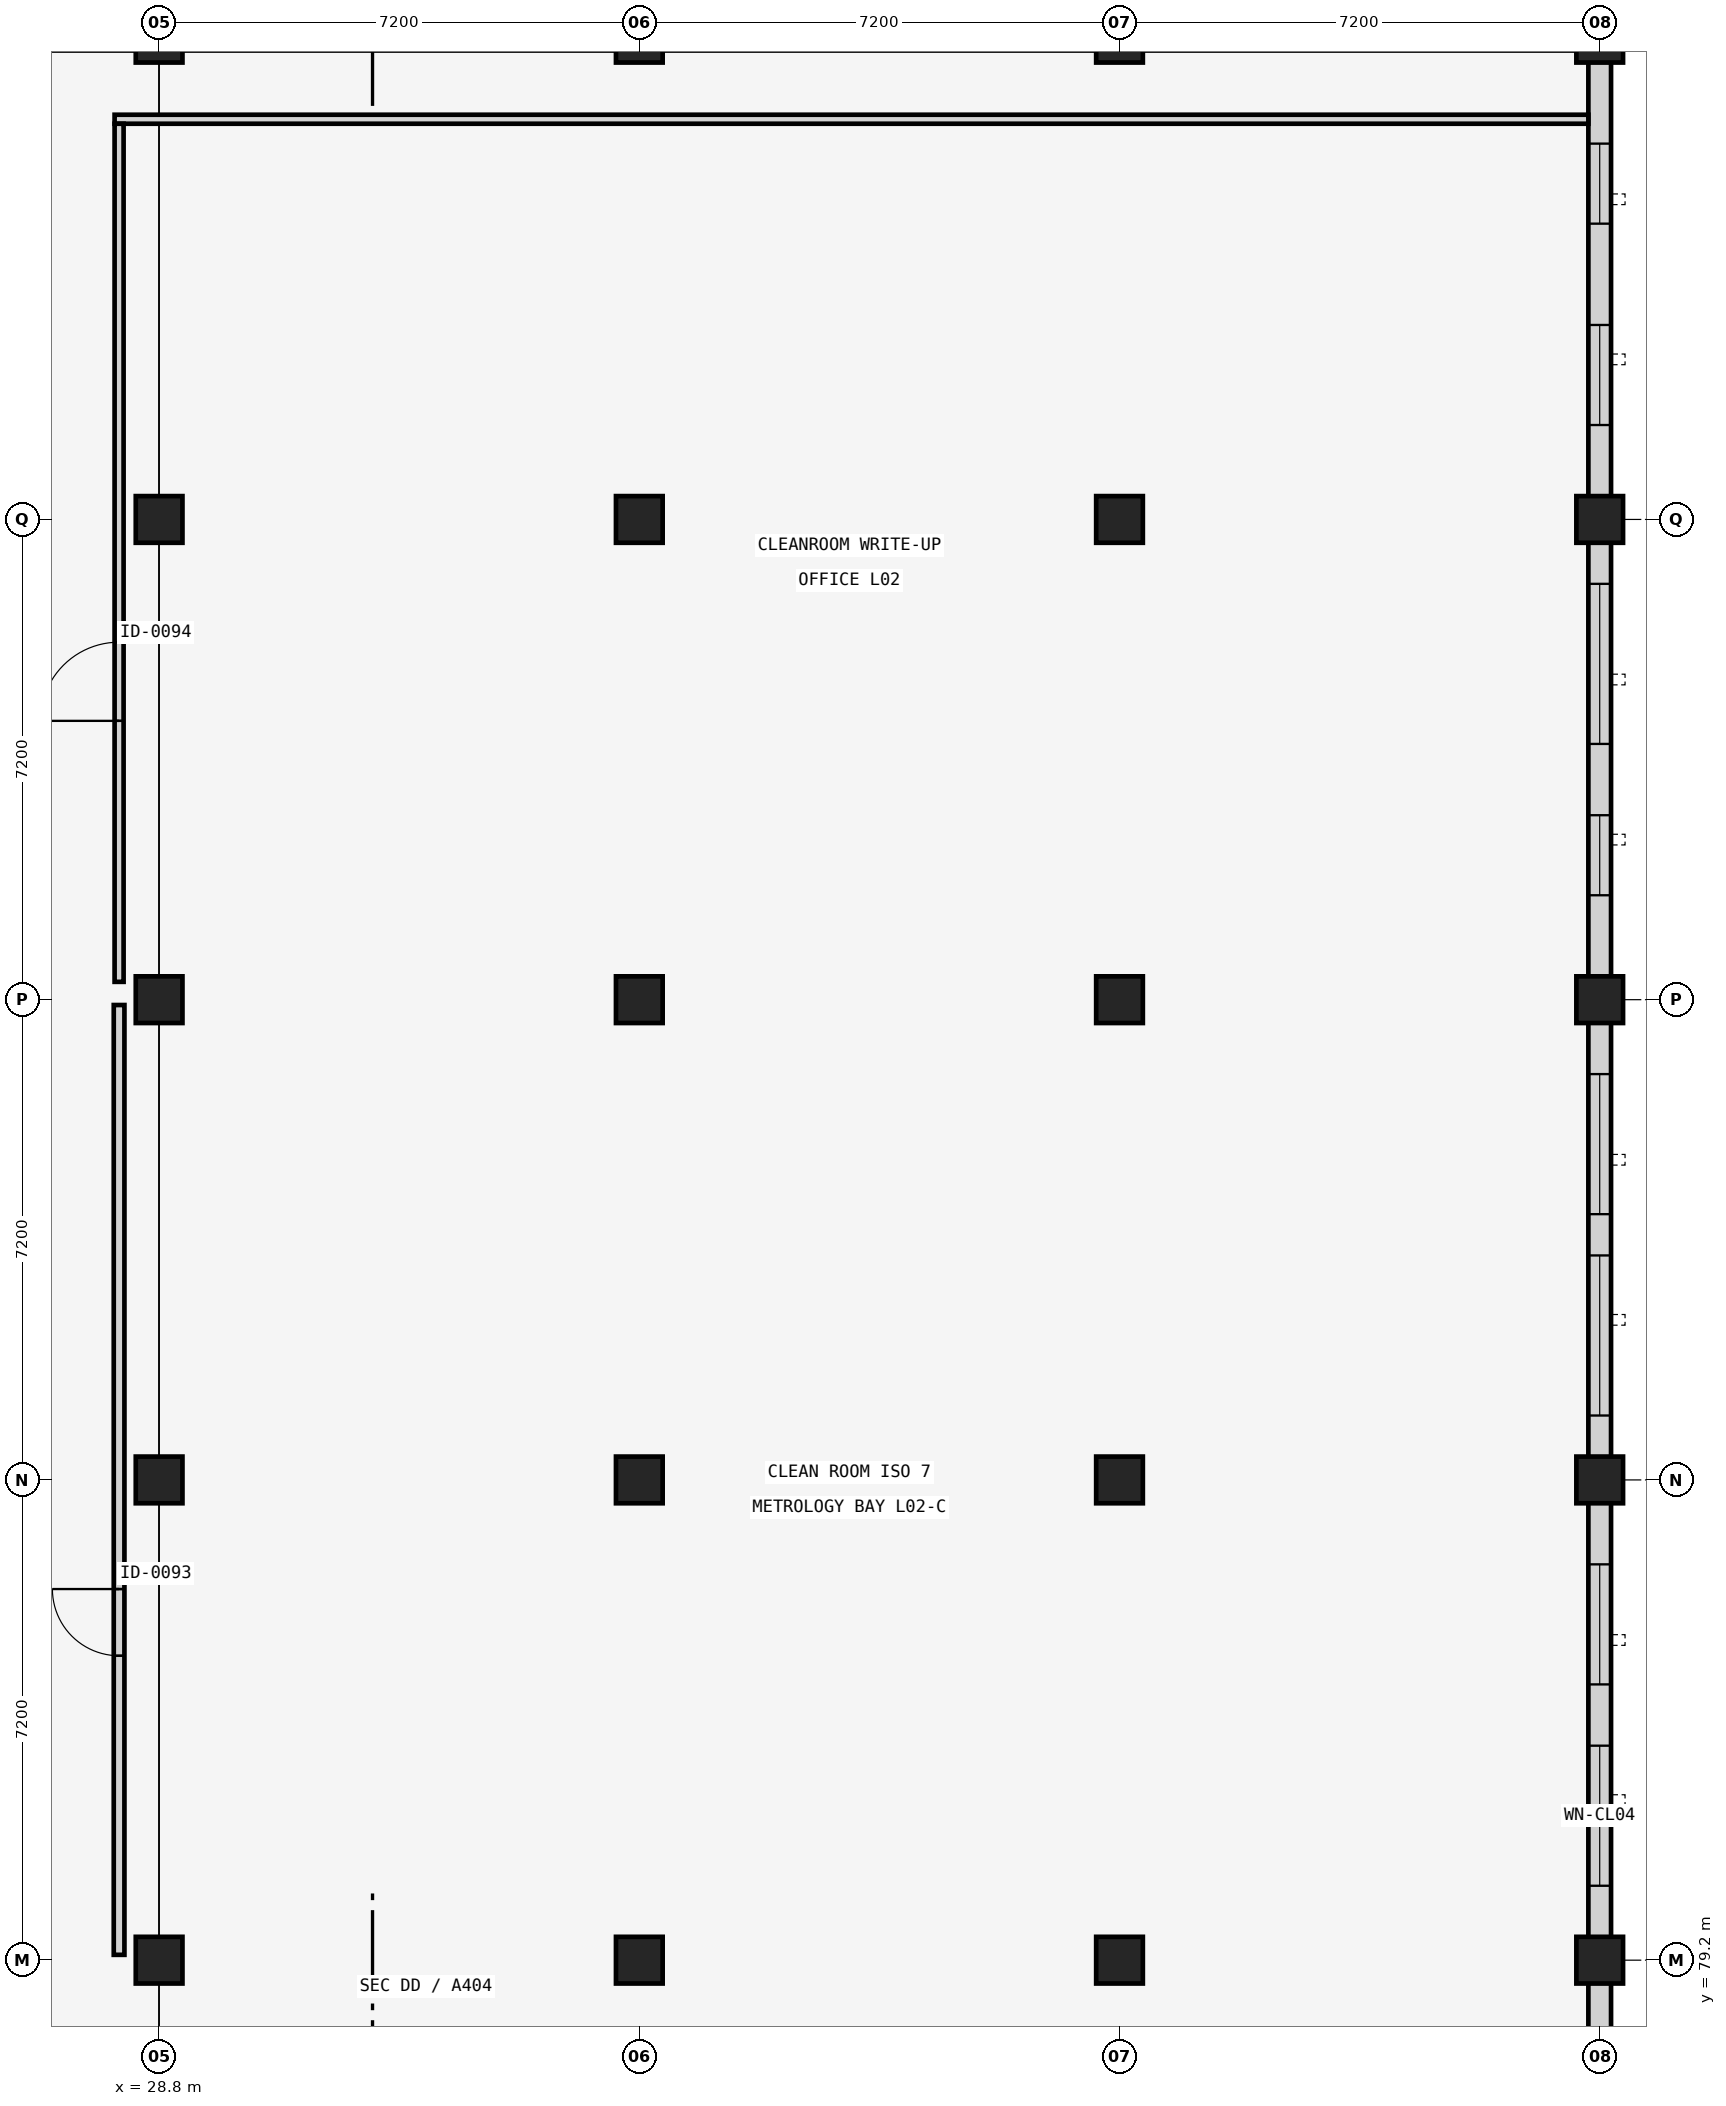
"""IFC4 building model, lengths in metres.
Left out: names, types, materials, properties, quantities, classifications, styles, units other than length and angle.
Written with IfcOpenShell. Run it as: python <this file> out.ifc"""

import sys

from ifc_helpers import new_model, si_unit, direction, frame, frame_2d, origin, origin_2d, place, context, subcontext, project, spatial, rectangle, extrude, element, fill, save


model = new_model("IFC4")
c1 = context("Model", 3, precision=1e-05, world=origin(), true_north=direction((0.0, 1.0)))
c2 = subcontext(c1, "Body", "Model", "MODEL_VIEW")
j1 = project(units=[si_unit("LENGTHUNIT", "METRE"), si_unit("PLANEANGLEUNIT", "RADIAN")], contexts=[c1])
p1 = place(None, origin())
s1 = spatial("IfcSite", under=j1, at=p1, CompositionType="ELEMENT")
p2 = place(p1, origin())
s2 = spatial("IfcBuilding", under=s1, at=p2, CompositionType="ELEMENT")
p3 = place(p2, frame((0.0, 0.0, 8.96)))
s3 = spatial("IfcBuildingStorey", under=s2, at=p3, CompositionType="ELEMENT", Elevation=8.96)
for number, where, z_axis, x_axis in (
    (1, (28.8, 79.2, 0.0), (0.0, 0.0, 1.0), (1.0, 0.0, 0.0)),
    (2, (28.8, 86.4, 0.0), (0.0, 0.0, 1.0), (1.0, 0.0, 0.0)),
    (3, (28.8, 93.6, 0.0), (0.0, 0.0, 1.0), (1.0, 0.0, 0.0)),
    (4, (28.8, 100.8, 0.0), (0.0, 0.0, 1.0), (1.0, 0.0, 0.0)),
    (5, (28.8, 108.0, 0.0), (0.0, 0.0, 1.0), (1.0, 0.0, 0.0)),
    (6, (36.0, 79.2, 0.0), (0.0, 0.0, 1.0), (1.0, 0.0, 0.0)),
    (7, (36.0, 86.4, 0.0), (0.0, 0.0, 1.0), (1.0, 0.0, 0.0)),
    (8, (36.0, 93.6, 0.0), (0.0, 0.0, 1.0), (1.0, 0.0, 0.0)),
    (9, (36.0, 100.8, 0.0), (0.0, 0.0, 1.0), (1.0, 0.0, 0.0)),
    (10, (36.0, 108.0, 0.0), (0.0, 0.0, 1.0), (1.0, 0.0, 0.0)),
    (11, (43.2, 79.2, 0.0), (0.0, 0.0, 1.0), (1.0, 0.0, 0.0)),
    (12, (43.2, 86.4, 0.0), (0.0, 0.0, 1.0), (1.0, 0.0, 0.0)),
    (13, (43.2, 93.6, 0.0), (0.0, 0.0, 1.0), (1.0, 0.0, 0.0)),
    (14, (43.2, 100.8, 0.0), (0.0, 0.0, 1.0), (1.0, 0.0, 0.0)),
    (15, (43.2, 108.0, 0.0), (0.0, 0.0, 1.0), (1.0, 0.0, 0.0)),
    (16, (50.4, 79.2, 0.0), (0.0, 0.0, 1.0), (1.0, 0.0, 0.0)),
    (17, (50.4, 86.4, 0.0), (0.0, 0.0, 1.0), (1.0, 0.0, 0.0)),
    (18, (50.4, 93.6, 0.0), (0.0, 0.0, 1.0), (1.0, 0.0, 0.0)),
    (19, (50.4, 100.8, 0.0), (0.0, 0.0, 1.0), (1.0, 0.0, 0.0)),
    (20, (50.4, 108.0, 0.0), (0.0, 0.0, 1.0), (1.0, 0.0, 0.0)),
):
    element("IfcColumn", number, at=place(p3, frame(where, z_axis=z_axis, x_axis=x_axis)), inside=s3, PredefinedType="COLUMN", context=c2, shape_type="SweptSolid", body=[
        extrude(rectangle(XDim=0.7, YDim=0.7, at=origin_2d()), origin(), (0.0, 0.0, 1.0), 4.16),
    ])
p4 = place(p3, frame((50.4, 72.34, 0.0), z_axis=(0.0, 0.0, 1.0), x_axis=(0.0, 1.0, 0.0)))
e21 = element("IfcWall", 21, at=p4, inside=s3, PredefinedType="SOLIDWALL", context=c2, shape_type="SweptSolid", body=[
    extrude(rectangle(XDim=6.52, YDim=0.34, at=frame_2d((3.26, 0.0))), origin(), (0.0, 0.0, 1.0), 3.21),
])
p5 = place(p4, frame((0.926, 0.0, 1.0)))
e22 = element("IfcOpeningElement", 22, at=p5, cuts=e21, PredefinedType="OPENING", context=c2, shape_type="SweptSolid", body=[
    extrude(rectangle(XDim=1.8, YDim=1.5, at=frame_2d((0.9, 0.75))), frame((0.0, 0.18, 0.0), z_axis=(0.0, -1.0, 0.0), x_axis=(1.0, 0.0, 0.0)), (0.0, 0.0, 1.0), 0.36),
])
p6 = place(p4, frame((3.944, 0.0, 1.0)))
e23 = element("IfcOpeningElement", 23, at=p6, cuts=e21, PredefinedType="OPENING", context=c2, shape_type="SweptSolid", body=[
    extrude(rectangle(XDim=1.5, YDim=1.65, at=frame_2d((0.75, 0.825))), frame((0.0, 0.18, 0.0), z_axis=(0.0, -1.0, 0.0), x_axis=(1.0, 0.0, 0.0)), (0.0, 0.0, 1.0), 0.36),
])
p7 = place(p3, frame((50.4, 79.54, 0.0), z_axis=(0.0, 0.0, 1.0), x_axis=(0.0, 1.0, 0.0)))
e24 = element("IfcWall", 24, at=p7, inside=s3, PredefinedType="SOLIDWALL", context=c2, shape_type="SweptSolid", body=[
    extrude(rectangle(XDim=6.52, YDim=0.34, at=frame_2d((3.26, 0.0))), origin(), (0.0, 0.0, 1.0), 3.21),
])
p8 = place(p7, frame((0.776, 0.0, 1.0)))
e25 = element("IfcOpeningElement", 25, at=p8, cuts=e24, PredefinedType="OPENING", context=c2, shape_type="SweptSolid", body=[
    extrude(rectangle(XDim=2.1, YDim=1.5, at=frame_2d((1.05, 0.75))), frame((0.0, 0.18, 0.0), z_axis=(0.0, -1.0, 0.0), x_axis=(1.0, 0.0, 0.0)), (0.0, 0.0, 1.0), 0.36),
])
p9 = place(p7, frame((3.794, 0.0, 1.0)))
e26 = element("IfcOpeningElement", 26, at=p9, cuts=e24, PredefinedType="OPENING", context=c2, shape_type="SweptSolid", body=[
    extrude(rectangle(XDim=1.8, YDim=1.65, at=frame_2d((0.9, 0.825))), frame((0.0, 0.18, 0.0), z_axis=(0.0, -1.0, 0.0), x_axis=(1.0, 0.0, 0.0)), (0.0, 0.0, 1.0), 0.36),
])
p10 = place(p3, frame((50.4, 86.74, 0.0), z_axis=(0.0, 0.0, 1.0), x_axis=(0.0, 1.0, 0.0)))
e27 = element("IfcWall", 27, at=p10, inside=s3, PredefinedType="SOLIDWALL", context=c2, shape_type="SweptSolid", body=[
    extrude(rectangle(XDim=6.52, YDim=0.34, at=frame_2d((3.26, 0.0))), origin(), (0.0, 0.0, 1.0), 3.21),
])
p11 = place(p10, frame((0.625, 0.0, 1.0)))
e28 = element("IfcOpeningElement", 28, at=p11, cuts=e27, PredefinedType="OPENING", context=c2, shape_type="SweptSolid", body=[
    extrude(rectangle(XDim=2.4, YDim=1.5, at=frame_2d((1.2, 0.75))), frame((0.0, 0.18, 0.0), z_axis=(0.0, -1.0, 0.0), x_axis=(1.0, 0.0, 0.0)), (0.0, 0.0, 1.0), 0.36),
])
p12 = place(p10, frame((3.644, 0.0, 1.0)))
e29 = element("IfcOpeningElement", 29, at=p12, cuts=e27, PredefinedType="OPENING", context=c2, shape_type="SweptSolid", body=[
    extrude(rectangle(XDim=2.1, YDim=1.65, at=frame_2d((1.05, 0.825))), frame((0.0, 0.18, 0.0), z_axis=(0.0, -1.0, 0.0), x_axis=(1.0, 0.0, 0.0)), (0.0, 0.0, 1.0), 0.36),
])
p13 = place(p3, frame((50.4, 93.94, 0.0), z_axis=(0.0, 0.0, 1.0), x_axis=(0.0, 1.0, 0.0)))
e30 = element("IfcWall", 30, at=p13, inside=s3, PredefinedType="SOLIDWALL", context=c2, shape_type="SweptSolid", body=[
    extrude(rectangle(XDim=6.52, YDim=0.34, at=frame_2d((3.26, 0.0))), origin(), (0.0, 0.0, 1.0), 3.21),
])
p14 = place(p13, frame((1.226, 0.0, 1.0)))
e31 = element("IfcOpeningElement", 31, at=p14, cuts=e30, PredefinedType="OPENING", context=c2, shape_type="SweptSolid", body=[
    extrude(rectangle(XDim=1.2, YDim=1.65, at=frame_2d((0.6, 0.825))), frame((0.0, 0.18, 0.0), z_axis=(0.0, -1.0, 0.0), x_axis=(1.0, 0.0, 0.0)), (0.0, 0.0, 1.0), 0.36),
])
p15 = place(p13, frame((3.494, 0.0, 1.0)))
e32 = element("IfcOpeningElement", 32, at=p15, cuts=e30, PredefinedType="OPENING", context=c2, shape_type="SweptSolid", body=[
    extrude(rectangle(XDim=2.4, YDim=1.65, at=frame_2d((1.2, 0.825))), frame((0.0, 0.18, 0.0), z_axis=(0.0, -1.0, 0.0), x_axis=(1.0, 0.0, 0.0)), (0.0, 0.0, 1.0), 0.36),
])
p16 = place(p3, frame((50.4, 101.14, 0.0), z_axis=(0.0, 0.0, 1.0), x_axis=(0.0, 1.0, 0.0)))
e33 = element("IfcWall", 33, at=p16, inside=s3, PredefinedType="SOLIDWALL", context=c2, shape_type="SweptSolid", body=[
    extrude(rectangle(XDim=6.52, YDim=0.34, at=frame_2d((3.26, 0.0))), origin(), (0.0, 0.0, 1.0), 3.21),
])
p17 = place(p16, frame((1.076, 0.0, 1.0)))
e34 = element("IfcOpeningElement", 34, at=p17, cuts=e33, PredefinedType="OPENING", context=c2, shape_type="SweptSolid", body=[
    extrude(rectangle(XDim=1.5, YDim=1.65, at=frame_2d((0.75, 0.825))), frame((0.0, 0.18, 0.0), z_axis=(0.0, -1.0, 0.0), x_axis=(1.0, 0.0, 0.0)), (0.0, 0.0, 1.0), 0.36),
])
p18 = place(p16, frame((4.094, 0.0, 1.0)))
e35 = element("IfcOpeningElement", 35, at=p18, cuts=e33, PredefinedType="OPENING", context=c2, shape_type="SweptSolid", body=[
    extrude(rectangle(XDim=1.2, YDim=1.5, at=frame_2d((0.6, 0.75))), frame((0.0, 0.18, 0.0), z_axis=(0.0, -1.0, 0.0), x_axis=(1.0, 0.0, 0.0)), (0.0, 0.0, 1.0), 0.36),
])
p19 = place(p3, frame((28.2, 79.28, 0.0), z_axis=(0.0, 0.0, 1.0), x_axis=(0.0, 1.0, 0.0)))
e36 = element("IfcWall", 36, at=p19, inside=s3, PredefinedType="PARTITIONING", context=c2, shape_type="SweptSolid", body=[
    extrude(rectangle(XDim=14.24, YDim=0.16, at=frame_2d((7.12, 0.0))), origin(), (0.0, 0.0, 1.0), 3.16),
])
p20 = place(p19, frame((4.484, 0.0, 0.0)))
e37 = element("IfcOpeningElement", 37, at=p20, cuts=e36, PredefinedType="OPENING", context=c2, shape_type="SweptSolid", body=[
    extrude(rectangle(XDim=1.0, YDim=2.15, at=frame_2d((0.5, 1.075))), frame((0.0, 0.09, 0.0), z_axis=(0.0, -1.0, 0.0), x_axis=(1.0, 0.0, 0.0)), (0.0, 0.0, 1.0), 0.18),
])
p21 = place(p3, frame((28.133, 106.8, 0.0), z_axis=(0.0, 0.0, 1.0), x_axis=(1.0, 0.0, 0.0)))
e38 = element("IfcWall", 38, at=p21, inside=s3, PredefinedType="PARTITIONING", context=c2, shape_type="SweptSolid", body=[
    extrude(rectangle(XDim=22.097, YDim=0.135, at=frame_2d((11.049, 0.0))), origin(), (0.0, 0.0, 1.0), 3.21),
])
p22 = place(p3, frame((28.2, 93.867, 0.0), z_axis=(0.0, 0.0, 1.0), x_axis=(0.0, 1.0, 0.0)))
e39 = element("IfcWall", 39, at=p22, inside=s3, PredefinedType="PARTITIONING", context=c2, shape_type="SweptSolid", body=[
    extrude(rectangle(XDim=12.865, YDim=0.135, at=frame_2d((6.433, 0.0))), origin(), (0.0, 0.0, 1.0), 3.16),
])
p23 = place(p22, frame((3.913, 0.0, 0.0)))
e40 = element("IfcOpeningElement", 40, at=p23, cuts=e39, PredefinedType="OPENING", context=c2, shape_type="SweptSolid", body=[
    extrude(rectangle(XDim=1.18, YDim=2.08, at=frame_2d((0.59, 1.04))), frame((0.0, 0.078, 0.0), z_axis=(0.0, -1.0, 0.0), x_axis=(1.0, 0.0, 0.0)), (0.0, 0.0, 1.0), 0.155),
])
p24 = place(p8, origin())
e41 = element("IfcWindow", 41, at=p24, inside=s3, PartitioningType="SINGLE_PANEL", PredefinedType="WINDOW", context=c2, shape_type="SweptSolid", body=[
    extrude(rectangle(XDim=2.1, YDim=1.5, at=frame_2d((1.05, 0.75))), frame((0.0, 0.03, 0.0), z_axis=(0.0, -1.0, 0.0), x_axis=(1.0, 0.0, 0.0)), (0.0, 0.0, 1.0), 0.06),
])
fill(e25, e41)
p25 = place(p9, origin())
e42 = element("IfcWindow", 42, at=p25, inside=s3, PartitioningType="SINGLE_PANEL", PredefinedType="WINDOW", context=c2, shape_type="SweptSolid", body=[
    extrude(rectangle(XDim=1.8, YDim=1.65, at=frame_2d((0.9, 0.825))), frame((0.0, 0.03, 0.0), z_axis=(0.0, -1.0, 0.0), x_axis=(1.0, 0.0, 0.0)), (0.0, 0.0, 1.0), 0.06),
])
fill(e26, e42)
p26 = place(p11, origin())
e43 = element("IfcWindow", 43, at=p26, inside=s3, PartitioningType="SINGLE_PANEL", PredefinedType="WINDOW", context=c2, shape_type="SweptSolid", body=[
    extrude(rectangle(XDim=2.4, YDim=1.5, at=frame_2d((1.2, 0.75))), frame((0.0, 0.03, 0.0), z_axis=(0.0, -1.0, 0.0), x_axis=(1.0, 0.0, 0.0)), (0.0, 0.0, 1.0), 0.06),
])
fill(e28, e43)
p27 = place(p12, origin())
e44 = element("IfcWindow", 44, at=p27, inside=s3, PartitioningType="SINGLE_PANEL", PredefinedType="WINDOW", context=c2, shape_type="SweptSolid", body=[
    extrude(rectangle(XDim=2.1, YDim=1.65, at=frame_2d((1.05, 0.825))), frame((0.0, 0.03, 0.0), z_axis=(0.0, -1.0, 0.0), x_axis=(1.0, 0.0, 0.0)), (0.0, 0.0, 1.0), 0.06),
])
fill(e29, e44)
p28 = place(p14, origin())
e45 = element("IfcWindow", 45, at=p28, inside=s3, PartitioningType="SINGLE_PANEL", PredefinedType="WINDOW", context=c2, shape_type="SweptSolid", body=[
    extrude(rectangle(XDim=1.2, YDim=1.65, at=frame_2d((0.6, 0.825))), frame((0.0, 0.03, 0.0), z_axis=(0.0, -1.0, 0.0), x_axis=(1.0, 0.0, 0.0)), (0.0, 0.0, 1.0), 0.06),
])
fill(e31, e45)
p29 = place(p15, origin())
e46 = element("IfcWindow", 46, at=p29, inside=s3, PartitioningType="SINGLE_PANEL", PredefinedType="WINDOW", context=c2, shape_type="SweptSolid", body=[
    extrude(rectangle(XDim=2.4, YDim=1.65, at=frame_2d((1.2, 0.825))), frame((0.0, 0.03, 0.0), z_axis=(0.0, -1.0, 0.0), x_axis=(1.0, 0.0, 0.0)), (0.0, 0.0, 1.0), 0.06),
])
fill(e32, e46)
p30 = place(p17, origin())
e47 = element("IfcWindow", 47, at=p30, inside=s3, PartitioningType="SINGLE_PANEL", PredefinedType="WINDOW", context=c2, shape_type="SweptSolid", body=[
    extrude(rectangle(XDim=1.5, YDim=1.65, at=frame_2d((0.75, 0.825))), frame((0.0, 0.03, 0.0), z_axis=(0.0, -1.0, 0.0), x_axis=(1.0, 0.0, 0.0)), (0.0, 0.0, 1.0), 0.06),
])
fill(e34, e47)
p31 = place(p18, origin())
e48 = element("IfcWindow", 48, at=p31, inside=s3, PartitioningType="SINGLE_PANEL", PredefinedType="WINDOW", context=c2, shape_type="SweptSolid", body=[
    extrude(rectangle(XDim=1.2, YDim=1.5, at=frame_2d((0.6, 0.75))), frame((0.0, 0.03, 0.0), z_axis=(0.0, -1.0, 0.0), x_axis=(1.0, 0.0, 0.0)), (0.0, 0.0, 1.0), 0.06),
])
fill(e35, e48)
p32 = place(p20, origin())
e49 = element("IfcDoor", 49, at=p32, inside=s3, OperationType="SINGLE_SWING_RIGHT", PredefinedType="DOOR", context=c2, shape_type="SweptSolid", body=[
    extrude(rectangle(XDim=1.0, YDim=2.15, at=frame_2d((0.5, 1.075))), frame((0.0, 0.025, 0.0), z_axis=(0.0, -1.0, 0.0), x_axis=(1.0, 0.0, 0.0)), (0.0, 0.0, 1.0), 0.05),
])
fill(e37, e49)
p33 = place(p23, origin())
e50 = element("IfcDoor", 50, at=p33, inside=s3, OperationType="SINGLE_SWING_LEFT", PredefinedType="DOOR", context=c2, shape_type="SweptSolid", body=[
    extrude(rectangle(XDim=1.18, YDim=2.08, at=frame_2d((0.59, 1.04))), frame((0.0, 0.025, 0.0), z_axis=(0.0, -1.0, 0.0), x_axis=(1.0, 0.0, 0.0)), (0.0, 0.0, 1.0), 0.05),
])
fill(e40, e50)
save(model, sys.argv[1])
